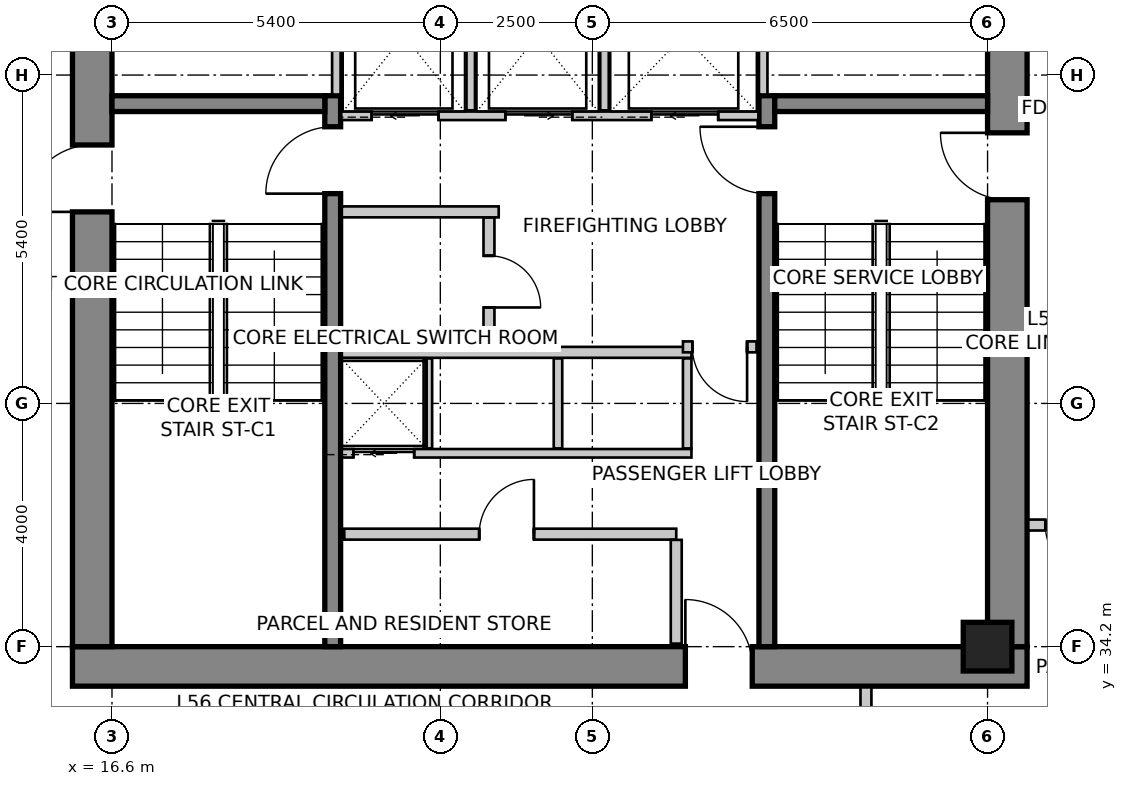
"""IFC4 building model, lengths in metres.
Left out: names, types, materials, properties, quantities, classifications, styles, units other than length and angle.
Written with IfcOpenShell. Run it as: python <this file> out.ifc"""

import sys

from ifc_helpers import new_model, si_unit, direction, frame, frame_2d, origin, origin_2d, place, context, subcontext, project, spatial, rectangle, extrude, source, transform, mapped, element, fill, save


model = new_model("IFC4")
c1 = context("Model", 3, precision=1e-05, world=origin(), true_north=direction((0.0, 1.0)))
c2 = subcontext(c1, "Body", "Model", "MODEL_VIEW")
j1 = project(units=[si_unit("LENGTHUNIT", "METRE"), si_unit("PLANEANGLEUNIT", "RADIAN")], contexts=[c1])
p1 = place(None, origin())
s1 = spatial("IfcSite", under=j1, at=p1, CompositionType="ELEMENT")
p2 = place(p1, origin())
s2 = spatial("IfcBuilding", under=s1, at=p2, CompositionType="ELEMENT")
p3 = place(p2, frame((0.0, 0.0, 221.9)))
s3 = spatial("IfcBuildingStorey", under=s2, at=p3, CompositionType="ELEMENT", Elevation=221.9)
p4 = place(p3, frame((15.95, 33.875, 0.0), z_axis=(0.0, 0.0, 1.0), x_axis=(1.0, 0.0, 0.0)))
e1 = element("IfcWall", 1, at=p4, inside=s3, PredefinedType="SHEAR", context=c2, shape_type="SweptSolid", body=[
    extrude(rectangle(XDim=15.7, YDim=0.65, at=frame_2d((7.85, 0.0))), origin(), (0.0, 0.0, 1.0), 3.5),
])
m1 = source(origin(), c2, "Body", "SweptSolid", [
    extrude(rectangle(XDim=1.1, YDim=2.15, at=frame_2d((0.55, 1.075))), frame((0.0, 0.335, 0.0), z_axis=(0.0, -1.0, 0.0), x_axis=(1.0, 0.0, 0.0)), (0.0, 0.0, 1.0), 0.67),
])
p5 = place(p4, frame((10.08, 0.0, 0.0)))
e2 = element("IfcOpeningElement", 2, at=p5, cuts=e1, PredefinedType="OPENING", context=c2, shape_type="MappedRepresentation", body=[
    mapped(m1, transform((0.0, 0.0, 0.0), scale=1.0)),
])
p6 = place(p3, frame((16.275, 34.2, 0.0), z_axis=(0.0, 0.0, 1.0), x_axis=(0.0, 1.0, 0.0)))
e3 = element("IfcWall", 3, at=p6, inside=s3, PredefinedType="SHEAR", context=c2, shape_type="SweptSolid", body=[
    extrude(rectangle(XDim=11.4, YDim=0.65, at=frame_2d((5.7, 0.0))), origin(), (0.0, 0.0, 1.0), 3.5),
])
p7 = place(p6, frame((7.15, 0.0, 0.0)))
e4 = element("IfcOpeningElement", 4, at=p7, cuts=e3, PredefinedType="OPENING", context=c2, shape_type="MappedRepresentation", body=[
    mapped(m1, transform((0.0, 0.0, 0.0), scale=1.0)),
])
p8 = place(p3, frame((31.325, 34.2, 0.0), z_axis=(0.0, 0.0, 1.0), x_axis=(0.0, 1.0, 0.0)))
e5 = element("IfcWall", 5, at=p8, inside=s3, PredefinedType="SHEAR", context=c2, shape_type="SweptSolid", body=[
    extrude(rectangle(XDim=11.4, YDim=0.65, at=frame_2d((5.7, 0.0))), origin(), (0.0, 0.0, 1.0), 3.5),
])
p9 = place(p8, frame((7.35, 0.0, 0.0)))
e6 = element("IfcOpeningElement", 6, at=p9, cuts=e5, PredefinedType="OPENING", context=c2, shape_type="MappedRepresentation", body=[
    mapped(m1, transform((0.0, 0.0, 0.0), scale=1.0)),
])
p10 = place(p3, frame((20.23, 34.2, 0.0), z_axis=(0.0, 0.0, 1.0), x_axis=(0.0, 1.0, 0.0)))
e7 = element("IfcWall", 7, at=p10, inside=s3, PredefinedType="SHEAR", context=c2, shape_type="SweptSolid", body=[
    extrude(rectangle(XDim=9.06, YDim=0.26, at=frame_2d((4.53, 0.0))), origin(), (0.0, 0.0, 1.0), 3.5),
])
m2 = source(origin(), c2, "Body", "SweptSolid", [
    extrude(rectangle(XDim=1.1, YDim=2.15, at=frame_2d((0.55, 1.075))), frame((0.0, 0.14, 0.0), z_axis=(0.0, -1.0, 0.0), x_axis=(1.0, 0.0, 0.0)), (0.0, 0.0, 1.0), 0.28),
])
p11 = place(p10, frame((7.45, 0.0, 0.0)))
e8 = element("IfcOpeningElement", 8, at=p11, cuts=e7, PredefinedType="OPENING", context=c2, shape_type="MappedRepresentation", body=[
    mapped(m2, transform((0.0, 0.0, 0.0), scale=1.0)),
])
p12 = place(p3, frame((27.37, 34.2, 0.0), z_axis=(0.0, 0.0, 1.0), x_axis=(0.0, 1.0, 0.0)))
e9 = element("IfcWall", 9, at=p12, inside=s3, PredefinedType="SHEAR", context=c2, shape_type="SweptSolid", body=[
    extrude(rectangle(XDim=9.06, YDim=0.26, at=frame_2d((4.53, 0.0))), origin(), (0.0, 0.0, 1.0), 3.5),
])
p13 = place(p12, frame((7.45, 0.0, 0.0)))
e10 = element("IfcOpeningElement", 10, at=p13, cuts=e9, PredefinedType="OPENING", context=c2, shape_type="MappedRepresentation", body=[
    mapped(m2, transform((0.0, 0.0, 0.0), scale=1.0)),
])
for number, where, z_axis, x_axis in (
    (11, (16.6, 43.13, 0.0), (0.0, 0.0, 1.0), (1.0, 0.0, 0.0)),
    (12, (27.5, 43.13, 0.0), (0.0, 0.0, 1.0), (1.0, 0.0, 0.0)),
):
    element("IfcWall", number, at=place(p3, frame(where, z_axis=z_axis, x_axis=x_axis)), inside=s3, PredefinedType="SHEAR", context=c2, shape_type="SweptSolid", body=[
        extrude(rectangle(XDim=3.5, YDim=0.26, at=frame_2d((1.75, 0.0))), origin(), (0.0, 0.0, 1.0), 3.5),
    ])
m3 = source(origin(), c2, "Body", "SweptSolid", [
    extrude(rectangle(XDim=0.8, YDim=0.8, at=origin_2d()), origin(), (0.0, 0.0, 1.0), 3.5),
])
p14 = place(p3, frame((31.0, 34.2, 0.0), z_axis=(0.0, 0.0, 1.0), x_axis=(1.0, 0.0, 0.0)))
e13 = element("IfcColumn", 13, at=p14, inside=s3, PredefinedType="COLUMN", context=c2, shape_type="MappedRepresentation", body=[
    mapped(m3, transform((0.0, 0.0, 0.0), scale=1.0)),
])
p15 = place(p3, frame((20.37, 42.93, 0.0), z_axis=(0.0, 0.0, 1.0), x_axis=(1.0, 0.0, 0.0)))
e14 = element("IfcWall", 14, at=p15, inside=s3, PredefinedType="SOLIDWALL", context=c2, shape_type="SweptSolid", body=[
    extrude(rectangle(XDim=6.86, YDim=0.14, at=frame_2d((3.43, 0.0))), origin(), (0.0, 0.0, 1.0), 3.25),
])
m4 = source(origin(), c2, "Body", "SweptSolid", [
    extrude(rectangle(XDim=1.1, YDim=2.15, at=frame_2d((0.55, 1.075))), frame((0.0, 0.08, 0.0), z_axis=(0.0, -1.0, 0.0), x_axis=(1.0, 0.0, 0.0)), (0.0, 0.0, 1.0), 0.16),
])
p16 = place(p15, frame((0.5, 0.0, 0.0)))
e15 = element("IfcOpeningElement", 15, at=p16, cuts=e14, PredefinedType="OPENING", context=c2, shape_type="MappedRepresentation", body=[
    mapped(m4, transform((0.0, 0.0, 0.0), scale=1.0)),
])
p17 = place(p15, frame((2.7, 0.0, 0.0)))
e16 = element("IfcOpeningElement", 16, at=p17, cuts=e14, PredefinedType="OPENING", context=c2, shape_type="MappedRepresentation", body=[
    mapped(m4, transform((0.0, 0.0, 0.0), scale=1.0)),
])
p18 = place(p15, frame((5.1, 0.0, 0.0)))
e17 = element("IfcOpeningElement", 17, at=p18, cuts=e14, PredefinedType="OPENING", context=c2, shape_type="MappedRepresentation", body=[
    mapped(m4, transform((0.0, 0.0, 0.0), scale=1.0)),
])
for number, where, z_axis, x_axis in (
    (18, (20.29, 43.28, 0.0), (0.0, 0.0, 1.0), (0.0, 1.0, 0.0)),
    (19, (27.31, 43.28, 0.0), (0.0, 0.0, 1.0), (0.0, 1.0, 0.0)),
):
    element("IfcWall", number, at=place(p3, frame(where, z_axis=z_axis, x_axis=x_axis)), inside=s3, PredefinedType="SOLIDWALL", context=c2, shape_type="SweptSolid", body=[
        extrude(rectangle(XDim=2.3, YDim=0.14, at=frame_2d((1.15, 0.0))), origin(), (0.0, 0.0, 1.0), 3.25),
    ])
for number, where, z_axis, x_axis in (
    (20, (22.5, 43.02, 0.0), (0.0, 0.0, 1.0), (0.0, 1.0, 0.0)),
    (21, (24.7, 43.02, 0.0), (0.0, 0.0, 1.0), (0.0, 1.0, 0.0)),
):
    element("IfcWall", number, at=place(p3, frame(where, z_axis=z_axis, x_axis=x_axis)), inside=s3, PredefinedType="SOLIDWALL", context=c2, shape_type="SweptSolid", body=[
        extrude(rectangle(XDim=2.56, YDim=0.14, at=frame_2d((1.28, 0.0))), origin(), (0.0, 0.0, 1.0), 3.25),
    ])
p19 = place(p3, frame((20.38, 37.38, 0.0), z_axis=(0.0, 0.0, 1.0), x_axis=(1.0, 0.0, 0.0)))
e22 = element("IfcWall", 22, at=p19, inside=s3, PredefinedType="SOLIDWALL", context=c2, shape_type="SweptSolid", body=[
    extrude(rectangle(XDim=5.75, YDim=0.14, at=frame_2d((2.875, 0.0))), origin(), (0.0, 0.0, 1.0), 3.25),
])
m5 = source(origin(), c2, "Body", "SweptSolid", [
    extrude(rectangle(XDim=1.0, YDim=2.15, at=frame_2d((0.5, 1.075))), frame((0.0, 0.08, 0.0), z_axis=(0.0, -1.0, 0.0), x_axis=(1.0, 0.0, 0.0)), (0.0, 0.0, 1.0), 0.16),
])
p20 = place(p19, frame((0.19, 0.0, 0.0)))
e23 = element("IfcOpeningElement", 23, at=p20, cuts=e22, PredefinedType="OPENING", context=c2, shape_type="MappedRepresentation", body=[
    mapped(m5, transform((0.0, 0.0, 0.0), scale=1.0)),
])
p21 = place(p3, frame((20.38, 39.04, 0.0), z_axis=(0.0, 0.0, 1.0), x_axis=(1.0, 0.0, 0.0)))
e24 = element("IfcWall", 24, at=p21, inside=s3, PredefinedType="SOLIDWALL", context=c2, shape_type="SweptSolid", body=[
    extrude(rectangle(XDim=5.75, YDim=0.18, at=frame_2d((2.875, 0.0))), origin(), (0.0, 0.0, 1.0), 3.25),
])
for number, where, z_axis, x_axis in (
    (25, (26.06, 37.46, 0.0), (0.0, 0.0, 1.0), (0.0, 1.0, 0.0)),
    (26, (21.795, 37.46, 0.0), (0.0, 0.0, 1.0), (0.0, 1.0, 0.0)),
    (27, (23.935, 37.46, 0.0), (0.0, 0.0, 1.0), (0.0, 1.0, 0.0)),
):
    element("IfcWall", number, at=place(p3, frame(where, z_axis=z_axis, x_axis=x_axis)), inside=s3, PredefinedType="SOLIDWALL", context=c2, shape_type="SweptSolid", body=[
        extrude(rectangle(XDim=1.48, YDim=0.14, at=frame_2d((0.74, 0.0))), origin(), (0.0, 0.0, 1.0), 3.25),
    ])
p22 = place(p3, frame((22.96, 41.35, 0.0), z_axis=(0.0, 0.0, 1.0), x_axis=(-1.0, 0.0, 0.0)))
e28 = element("IfcWall", 28, at=p22, inside=s3, PredefinedType="PARTITIONING", context=c2, shape_type="SweptSolid", body=[
    extrude(rectangle(XDim=2.58, YDim=0.18, at=frame_2d((1.29, 0.0))), origin(), (0.0, 0.0, 1.0), 3.25),
])
p23 = place(p3, frame((22.8, 41.256, 0.0), z_axis=(0.0, 0.0, 1.0), x_axis=(0.0, -1.0, 0.0)))
e29 = element("IfcWall", 29, at=p23, inside=s3, PredefinedType="PARTITIONING", context=c2, shape_type="SweptSolid", body=[
    extrude(rectangle(XDim=2.106, YDim=0.18, at=frame_2d((1.053, 0.0))), origin(), (0.0, 0.0, 1.0), 3.25),
])
m6 = source(origin(), c2, "Body", "SweptSolid", [
    extrude(rectangle(XDim=0.85, YDim=2.15, at=frame_2d((0.425, 1.075))), frame((0.0, 0.1, 0.0), z_axis=(0.0, -1.0, 0.0), x_axis=(1.0, 0.0, 0.0)), (0.0, 0.0, 1.0), 0.2),
])
p24 = place(p23, frame((0.628, 0.0, 0.0)))
e30 = element("IfcOpeningElement", 30, at=p24, cuts=e29, PredefinedType="OPENING", context=c2, shape_type="MappedRepresentation", body=[
    mapped(m6, transform((0.0, 0.0, 0.0), scale=1.0)),
])
p25 = place(p3, frame((27.2, 39.13, 0.0), z_axis=(0.0, 0.0, 1.0), x_axis=(-1.0, 0.0, 0.0)))
e31 = element("IfcWall", 31, at=p25, inside=s3, PredefinedType="PARTITIONING", context=c2, shape_type="SweptSolid", body=[
    extrude(rectangle(XDim=1.21, YDim=0.18, at=frame_2d((0.605, 0.0))), origin(), (0.0, 0.0, 1.0), 3.25),
])
m7 = source(origin(), c2, "Body", "SweptSolid", [
    extrude(rectangle(XDim=0.9, YDim=2.15, at=frame_2d((0.45, 1.075))), frame((0.0, 0.1, 0.0), z_axis=(0.0, -1.0, 0.0), x_axis=(1.0, 0.0, 0.0)), (0.0, 0.0, 1.0), 0.2),
])
p26 = place(p25, frame((0.155, 0.0, 0.0)))
e32 = element("IfcOpeningElement", 32, at=p26, cuts=e31, PredefinedType="OPENING", context=c2, shape_type="MappedRepresentation", body=[
    mapped(m7, transform((0.0, 0.0, 0.0), scale=1.0)),
])
p27 = place(p3, frame((20.42, 36.05, 0.0), z_axis=(0.0, 0.0, 1.0), x_axis=(1.0, 0.0, 0.0)))
e33 = element("IfcWall", 33, at=p27, inside=s3, PredefinedType="PARTITIONING", context=c2, shape_type="SweptSolid", body=[
    extrude(rectangle(XDim=5.46, YDim=0.18, at=frame_2d((2.73, 0.0))), origin(), (0.0, 0.0, 1.0), 3.25),
])
p28 = place(p27, frame((2.219, 0.0, 0.0)))
e34 = element("IfcOpeningElement", 34, at=p28, cuts=e33, PredefinedType="OPENING", context=c2, shape_type="MappedRepresentation", body=[
    mapped(m7, transform((0.0, 0.0, 0.0), scale=1.0)),
])
p29 = place(p3, frame((25.88, 35.956, 0.0), z_axis=(0.0, 0.0, 1.0), x_axis=(0.0, -1.0, 0.0)))
e35 = element("IfcWall", 35, at=p29, inside=s3, PredefinedType="PARTITIONING", context=c2, shape_type="SweptSolid", body=[
    extrude(rectangle(XDim=1.706, YDim=0.18, at=frame_2d((0.853, 0.0))), origin(), (0.0, 0.0, 1.0), 2.542),
])
p30 = place(p3, frame((29.0, 33.53, 0.0), z_axis=(0.0, 0.0, 1.0), x_axis=(0.0, -1.0, 0.0)))
e36 = element("IfcWall", 36, at=p30, inside=s3, PredefinedType="PARTITIONING", context=c2, shape_type="SweptSolid", body=[
    extrude(rectangle(XDim=1.127, YDim=0.18, at=frame_2d((0.563, 0.0))), origin(), (0.0, 0.0, 1.0), 3.25),
])
p31 = place(p3, frame((33.15, 36.2, 0.0), z_axis=(0.0, 0.0, 1.0), x_axis=(-1.0, 0.0, 0.0)))
e37 = element("IfcWall", 37, at=p31, inside=s3, PredefinedType="PARTITIONING", context=c2, shape_type="SweptSolid", body=[
    extrude(rectangle(XDim=1.48, YDim=0.18, at=frame_2d((0.74, 0.0))), origin(), (0.0, 0.0, 1.0), 3.25),
])
p32 = place(p31, frame((0.35, 0.0, 0.0)))
e38 = element("IfcOpeningElement", 38, at=p32, cuts=e37, PredefinedType="OPENING", context=c2, shape_type="MappedRepresentation", body=[
    mapped(m6, transform((0.0, 0.0, 0.0), scale=1.0)),
])
m8 = source(origin(), c2, "Body", "SweptSolid", [
    extrude(rectangle(XDim=1.1, YDim=2.15, at=frame_2d((0.55, 1.075))), frame((0.0, 0.025, 0.0), z_axis=(0.0, -1.0, 0.0), x_axis=(1.0, 0.0, 0.0)), (0.0, 0.0, 1.0), 0.05),
])
p33 = place(p16, origin())
e39 = element("IfcDoor", 39, at=p33, inside=s3, OperationType="SLIDING_TO_LEFT", PredefinedType="DOOR", context=c2, shape_type="MappedRepresentation", body=[
    mapped(m8, transform((0.0, 0.0, 0.0), scale=1.0)),
])
fill(e15, e39)
p34 = place(p17, origin())
e40 = element("IfcDoor", 40, at=p34, inside=s3, OperationType="SLIDING_TO_RIGHT", PredefinedType="DOOR", context=c2, shape_type="MappedRepresentation", body=[
    mapped(m8, transform((0.0, 0.0, 0.0), scale=1.0)),
])
fill(e16, e40)
m9 = source(origin(), c2, "Body", "SweptSolid", [
    extrude(rectangle(XDim=1.1, YDim=2.15, at=frame_2d((0.55, 1.075))), frame((0.0, 0.025, 0.0), z_axis=(0.0, -1.0, 0.0), x_axis=(1.0, 0.0, 0.0)), (0.0, 0.0, 1.0), 0.05),
])
p35 = place(p18, origin())
e41 = element("IfcDoor", 41, at=p35, inside=s3, OperationType="SLIDING_TO_LEFT", PredefinedType="DOOR", context=c2, shape_type="MappedRepresentation", body=[
    mapped(m9, transform((0.0, 0.0, 0.0), scale=1.0)),
])
fill(e17, e41)
m10 = source(origin(), c2, "Body", "SweptSolid", [
    extrude(rectangle(XDim=1.0, YDim=2.15, at=frame_2d((0.5, 1.075))), frame((0.0, 0.025, 0.0), z_axis=(0.0, -1.0, 0.0), x_axis=(1.0, 0.0, 0.0)), (0.0, 0.0, 1.0), 0.05),
])
p36 = place(p20, origin())
e42 = element("IfcDoor", 42, at=p36, inside=s3, OperationType="SLIDING_TO_LEFT", PredefinedType="DOOR", context=c2, shape_type="MappedRepresentation", body=[
    mapped(m10, transform((0.0, 0.0, 0.0), scale=1.0)),
])
fill(e23, e42)
m11 = source(origin(), c2, "Body", "SweptSolid", [
    extrude(rectangle(XDim=1.1, YDim=2.15, at=frame_2d((0.55, 1.075))), frame((0.0, 0.025, 0.0), z_axis=(0.0, -1.0, 0.0), x_axis=(1.0, 0.0, 0.0)), (0.0, 0.0, 1.0), 0.05),
])
p37 = place(p11, origin())
e43 = element("IfcDoor", 43, at=p37, inside=s3, OperationType="SINGLE_SWING_LEFT", PredefinedType="DOOR", context=c2, shape_type="MappedRepresentation", body=[
    mapped(m11, transform((0.0, 0.0, 0.0), scale=1.0)),
])
fill(e8, e43)
p38 = place(p13, origin())
e44 = element("IfcDoor", 44, at=p38, inside=s3, OperationType="SINGLE_SWING_RIGHT", PredefinedType="DOOR", context=c2, shape_type="MappedRepresentation", body=[
    mapped(m11, transform((0.0, 0.0, 0.0), scale=1.0)),
])
fill(e10, e44)
p39 = place(p7, origin())
e45 = element("IfcDoor", 45, at=p39, inside=s3, OperationType="SINGLE_SWING_LEFT", PredefinedType="DOOR", context=c2, shape_type="MappedRepresentation", body=[
    mapped(m11, transform((0.0, 0.0, 0.0), scale=1.0)),
])
fill(e4, e45)
p40 = place(p9, origin())
e46 = element("IfcDoor", 46, at=p40, inside=s3, OperationType="SINGLE_SWING_RIGHT", PredefinedType="DOOR", context=c2, shape_type="MappedRepresentation", body=[
    mapped(m11, transform((0.0, 0.0, 0.0), scale=1.0)),
])
fill(e6, e46)
p41 = place(p5, origin())
e47 = element("IfcDoor", 47, at=p41, inside=s3, OperationType="SINGLE_SWING_LEFT", PredefinedType="DOOR", context=c2, shape_type="MappedRepresentation", body=[
    mapped(m11, transform((0.0, 0.0, 0.0), scale=1.0)),
])
fill(e2, e47)
m12 = source(origin(), c2, "Body", "SweptSolid", [
    extrude(rectangle(XDim=0.85, YDim=2.15, at=frame_2d((0.425, 1.075))), frame((0.0, 0.025, 0.0), z_axis=(0.0, -1.0, 0.0), x_axis=(1.0, 0.0, 0.0)), (0.0, 0.0, 1.0), 0.05),
])
p42 = place(p24, origin())
e48 = element("IfcDoor", 48, at=p42, inside=s3, OperationType="SINGLE_SWING_RIGHT", PredefinedType="DOOR", context=c2, shape_type="MappedRepresentation", body=[
    mapped(m12, transform((0.0, 0.0, 0.0), scale=1.0)),
])
fill(e30, e48)
m13 = source(origin(), c2, "Body", "SweptSolid", [
    extrude(rectangle(XDim=0.9, YDim=2.15, at=frame_2d((0.45, 1.075))), frame((0.0, 0.025, 0.0), z_axis=(0.0, -1.0, 0.0), x_axis=(1.0, 0.0, 0.0)), (0.0, 0.0, 1.0), 0.05),
])
p43 = place(p26, origin())
e49 = element("IfcDoor", 49, at=p43, inside=s3, OperationType="SINGLE_SWING_LEFT", PredefinedType="DOOR", context=c2, shape_type="MappedRepresentation", body=[
    mapped(m13, transform((0.0, 0.0, 0.0), scale=1.0)),
])
fill(e32, e49)
p44 = place(p28, origin())
e50 = element("IfcDoor", 50, at=p44, inside=s3, OperationType="SINGLE_SWING_RIGHT", PredefinedType="DOOR", context=c2, shape_type="MappedRepresentation", body=[
    mapped(m13, transform((0.0, 0.0, 0.0), scale=1.0)),
])
fill(e34, e50)
m14 = source(origin(), c2, "Body", "SweptSolid", [
    extrude(rectangle(XDim=0.85, YDim=2.15, at=frame_2d((0.425, 1.075))), frame((0.0, 0.025, 0.0), z_axis=(0.0, -1.0, 0.0), x_axis=(1.0, 0.0, 0.0)), (0.0, 0.0, 1.0), 0.05),
])
p45 = place(p32, origin())
e51 = element("IfcDoor", 51, at=p45, inside=s3, OperationType="SINGLE_SWING_LEFT", PredefinedType="DOOR", context=c2, shape_type="MappedRepresentation", body=[
    mapped(m14, transform((0.0, 0.0, 0.0), scale=1.0)),
])
fill(e38, e51)
save(model, sys.argv[1])
